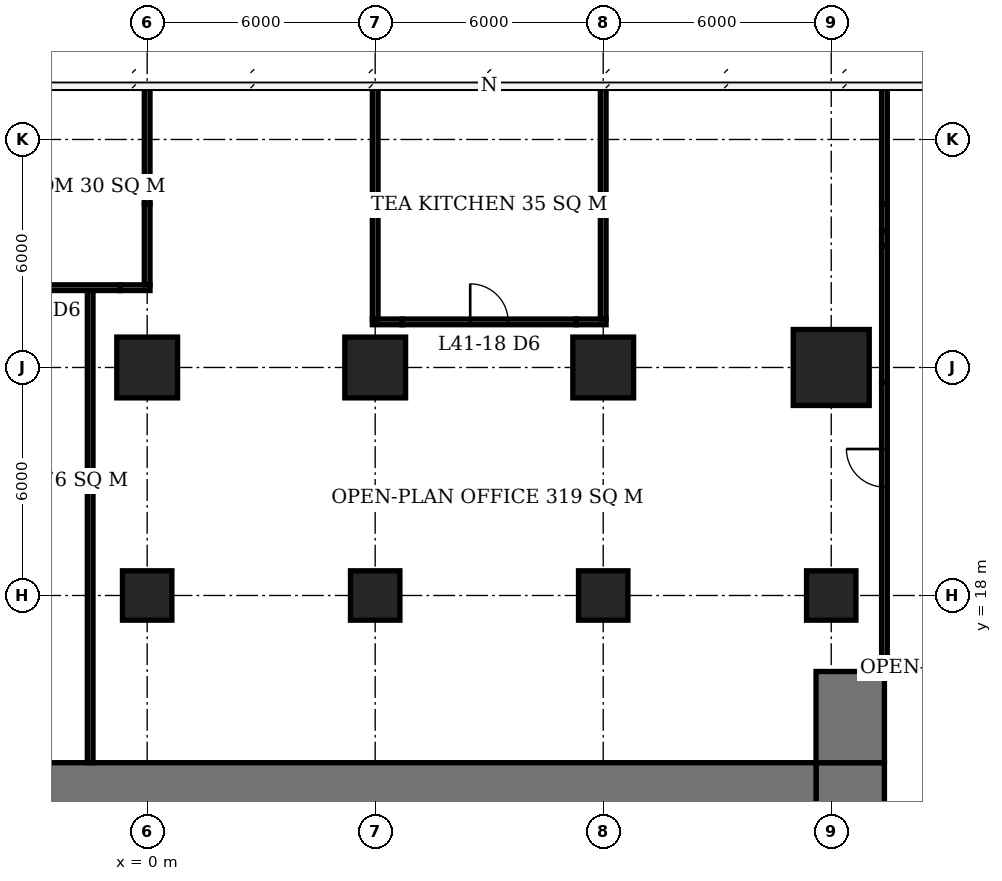
"""IFC4 building model, lengths in metres.
Left out: names, types, materials, properties, quantities, classifications, styles, units other than length and angle.
Written with IfcOpenShell. Run it as: python <this file> out.ifc"""

import sys

from ifc_helpers import new_model, si_unit, direction, frame, frame_2d, origin, origin_2d, place, context, subcontext, project, spatial, rectangle, extrude, element, fill, save


model = new_model("IFC4")
c1 = context("Model", 3, precision=1e-05, world=origin(), true_north=direction((0.0, 1.0)))
c2 = subcontext(c1, "Body", "Model", "MODEL_VIEW")
j1 = project(units=[si_unit("LENGTHUNIT", "METRE"), si_unit("PLANEANGLEUNIT", "RADIAN")], contexts=[c1])
p1 = place(None, origin())
s1 = spatial("IfcSite", under=j1, at=p1, CompositionType="ELEMENT")
p2 = place(p1, origin())
s2 = spatial("IfcBuilding", under=s1, at=p2, CompositionType="ELEMENT")
p3 = place(p2, frame((0.0, 0.0, 169.4)))
s3 = spatial("IfcBuildingStorey", under=s2, at=p3, CompositionType="ELEMENT", Elevation=169.4)
p4 = place(p3, frame((0.0, 18.0, 0.0), z_axis=(0.0, 0.0, 1.0), x_axis=(1.0, 0.0, 0.0)))
e1 = element("IfcColumn", 1, at=p4, inside=s3, PredefinedType="COLUMN", context=c2, shape_type="SweptSolid", body=[
    extrude(rectangle(XDim=1.3, YDim=1.3, at=origin_2d()), origin(), (0.0, 0.0, 1.0), 3.9),
])
p5 = place(p3, frame((0.0, 24.0, 0.0), z_axis=(0.0, 0.0, 1.0), x_axis=(1.0, 0.0, 0.0)))
e2 = element("IfcColumn", 2, at=p5, inside=s3, PredefinedType="COLUMN", context=c2, shape_type="SweptSolid", body=[
    extrude(rectangle(XDim=1.6, YDim=1.6, at=origin_2d()), origin(), (0.0, 0.0, 1.0), 3.9),
])
p6 = place(p3, frame((6.0, 18.0, 0.0), z_axis=(0.0, 0.0, 1.0), x_axis=(1.0, 0.0, 0.0)))
e3 = element("IfcColumn", 3, at=p6, inside=s3, PredefinedType="COLUMN", context=c2, shape_type="SweptSolid", body=[
    extrude(rectangle(XDim=1.3, YDim=1.3, at=origin_2d()), origin(), (0.0, 0.0, 1.0), 3.9),
])
p7 = place(p3, frame((6.0, 24.0, 0.0), z_axis=(0.0, 0.0, 1.0), x_axis=(1.0, 0.0, 0.0)))
e4 = element("IfcColumn", 4, at=p7, inside=s3, PredefinedType="COLUMN", context=c2, shape_type="SweptSolid", body=[
    extrude(rectangle(XDim=1.6, YDim=1.6, at=origin_2d()), origin(), (0.0, 0.0, 1.0), 3.9),
])
p8 = place(p3, frame((12.0, 18.0, 0.0), z_axis=(0.0, 0.0, 1.0), x_axis=(1.0, 0.0, 0.0)))
e5 = element("IfcColumn", 5, at=p8, inside=s3, PredefinedType="COLUMN", context=c2, shape_type="SweptSolid", body=[
    extrude(rectangle(XDim=1.3, YDim=1.3, at=origin_2d()), origin(), (0.0, 0.0, 1.0), 3.9),
])
p9 = place(p3, frame((12.0, 24.0, 0.0), z_axis=(0.0, 0.0, 1.0), x_axis=(1.0, 0.0, 0.0)))
e6 = element("IfcColumn", 6, at=p9, inside=s3, PredefinedType="COLUMN", context=c2, shape_type="SweptSolid", body=[
    extrude(rectangle(XDim=1.6, YDim=1.6, at=origin_2d()), origin(), (0.0, 0.0, 1.0), 3.9),
])
p10 = place(p3, frame((18.0, 18.0, 0.0), z_axis=(0.0, 0.0, 1.0), x_axis=(1.0, 0.0, 0.0)))
e7 = element("IfcColumn", 7, at=p10, inside=s3, PredefinedType="COLUMN", context=c2, shape_type="SweptSolid", body=[
    extrude(rectangle(XDim=1.3, YDim=1.3, at=origin_2d()), origin(), (0.0, 0.0, 1.0), 3.9),
])
p11 = place(p3, frame((18.0, 24.0, 0.0), z_axis=(0.0, 0.0, 1.0), x_axis=(1.0, 0.0, 0.0)))
e8 = element("IfcColumn", 8, at=p11, inside=s3, PredefinedType="COLUMN", context=c2, shape_type="SweptSolid", body=[
    extrude(rectangle(XDim=2.0, YDim=2.0, at=origin_2d()), origin(), (0.0, 0.0, 1.0), 3.9),
])
p12 = place(p3, frame((-5.6, 12.6, 0.0), z_axis=(0.0, 0.0, 1.0), x_axis=(1.0, 0.0, 0.0)))
e9 = element("IfcWall", 9, at=p12, inside=s3, PredefinedType="SHEAR", context=c2, shape_type="SweptSolid", body=[
    extrude(rectangle(XDim=23.2, YDim=2.0, at=frame_2d((11.6, 0.0))), origin(), (0.0, 0.0, 1.0), 3.9),
])
p13 = place(p3, frame((18.5, -7.6, 0.0), z_axis=(0.0, 0.0, 1.0), x_axis=(0.0, 1.0, 0.0)))
e10 = element("IfcWall", 10, at=p13, inside=s3, PredefinedType="SHEAR", context=c2, shape_type="SweptSolid", body=[
    extrude(rectangle(XDim=21.2, YDim=1.8, at=frame_2d((10.6, 0.0))), origin(), (0.0, 0.0, 1.0), 3.9),
])
p14 = place(p13, frame((9.2, 0.0, 0.0)))
e11 = element("IfcOpeningElement", 11, at=p14, cuts=e10, PredefinedType="OPENING", context=c2, shape_type="SweptSolid", body=[
    extrude(rectangle(XDim=1.8, YDim=2.4, at=frame_2d((0.9, 1.2))), frame((0.0, 0.91, 0.0), z_axis=(0.0, -1.0, 0.0), x_axis=(1.0, 0.0, 0.0)), (0.0, 0.0, 1.0), 1.82),
])
p15 = place(p3, frame((18.5, 13.6, 0.0), z_axis=(0.0, 0.0, 1.0), x_axis=(0.0, 1.0, 0.0)))
e12 = element("IfcWall", 12, at=p15, inside=s3, PredefinedType="SHEAR", context=c2, shape_type="SweptSolid", body=[
    extrude(rectangle(XDim=2.4, YDim=1.8, at=frame_2d((1.2, 0.0))), origin(), (0.0, 0.0, 1.0), 3.9),
])
p16 = place(p3, frame((5.925, 25.2, 0.0), z_axis=(0.0, 0.0, 1.0), x_axis=(1.0, 0.0, 0.0)))
e13 = element("IfcWall", 13, at=p16, inside=s3, PredefinedType="PARTITIONING", context=c2, shape_type="SweptSolid", body=[
    extrude(rectangle(XDim=0.785, YDim=0.15, at=frame_2d((0.393, 0.0))), origin(), (0.0, 0.0, 1.0), 2.65),
])
p17 = place(p3, frame((6.71, 25.2, 0.0), z_axis=(0.0, 0.0, 1.0), x_axis=(1.0, 0.0, 0.0)))
e14 = element("IfcWall", 14, at=p17, inside=s3, PredefinedType="PARTITIONING", context=c2, shape_type="SweptSolid", body=[
    extrude(rectangle(XDim=4.58, YDim=0.15, at=frame_2d((2.29, 0.0))), origin(), (0.0, 0.0, 1.0), 3.65),
])
p18 = place(p17, frame((1.79, 0.0, 0.0)))
e15 = element("IfcOpeningElement", 15, at=p18, cuts=e14, PredefinedType="OPENING", context=c2, shape_type="SweptSolid", body=[
    extrude(rectangle(XDim=1.0, YDim=2.1, at=frame_2d((0.5, 1.05))), frame((0.0, 0.085, 0.0), z_axis=(0.0, -1.0, 0.0), x_axis=(1.0, 0.0, 0.0)), (0.0, 0.0, 1.0), 0.17),
])
p19 = place(p3, frame((11.29, 25.2, 0.0), z_axis=(0.0, 0.0, 1.0), x_axis=(1.0, 0.0, 0.0)))
e16 = element("IfcWall", 16, at=p19, inside=s3, PredefinedType="PARTITIONING", context=c2, shape_type="SweptSolid", body=[
    extrude(rectangle(XDim=0.785, YDim=0.15, at=frame_2d((0.393, 0.0))), origin(), (0.0, 0.0, 1.0), 2.65),
])
p20 = place(p3, frame((-5.49, 26.1, 0.0), z_axis=(0.0, 0.0, 1.0), x_axis=(1.0, 0.0, 0.0)))
e17 = element("IfcWall", 17, at=p20, inside=s3, PredefinedType="PARTITIONING", context=c2, shape_type="SweptSolid", body=[
    extrude(rectangle(XDim=4.78, YDim=0.15, at=frame_2d((2.39, 0.0))), origin(), (0.0, 0.0, 1.0), 3.65),
])
p21 = place(p20, frame((1.89, 0.0, 0.0)))
e18 = element("IfcOpeningElement", 18, at=p21, cuts=e17, PredefinedType="OPENING", context=c2, shape_type="SweptSolid", body=[
    extrude(rectangle(XDim=1.0, YDim=2.1, at=frame_2d((0.5, 1.05))), frame((0.0, 0.085, 0.0), z_axis=(0.0, -1.0, 0.0), x_axis=(1.0, 0.0, 0.0)), (0.0, 0.0, 1.0), 0.17),
])
p22 = place(p3, frame((-0.71, 26.1, 0.0), z_axis=(0.0, 0.0, 1.0), x_axis=(1.0, 0.0, 0.0)))
e19 = element("IfcWall", 19, at=p22, inside=s3, PredefinedType="PARTITIONING", context=c2, shape_type="SweptSolid", body=[
    extrude(rectangle(XDim=0.785, YDim=0.15, at=frame_2d((0.393, 0.0))), origin(), (0.0, 0.0, 1.0), 2.65),
])
p23 = place(p3, frame((0.0, 26.175, 0.0), z_axis=(0.0, 0.0, 1.0), x_axis=(0.0, 1.0, 0.0)))
e20 = element("IfcWall", 20, at=p23, inside=s3, PredefinedType="PARTITIONING", context=c2, shape_type="SweptSolid", body=[
    extrude(rectangle(XDim=2.135, YDim=0.15, at=frame_2d((1.067, 0.0))), origin(), (0.0, 0.0, 1.0), 2.65),
])
p24 = place(p3, frame((0.0, 28.31, 0.0), z_axis=(0.0, 0.0, 1.0), x_axis=(0.0, 1.0, 0.0)))
e21 = element("IfcWall", 21, at=p24, inside=s3, PredefinedType="PARTITIONING", context=c2, shape_type="SweptSolid", body=[
    extrude(rectangle(XDim=3.065, YDim=0.15, at=frame_2d((1.532, 0.0))), origin(), (0.0, 0.0, 1.0), 3.65),
])
p25 = place(p3, frame((6.0, 25.275, 0.0), z_axis=(0.0, 0.0, 1.0), x_axis=(0.0, 1.0, 0.0)))
e22 = element("IfcWall", 22, at=p25, inside=s3, PredefinedType="PARTITIONING", context=c2, shape_type="SweptSolid", body=[
    extrude(rectangle(XDim=3.035, YDim=0.15, at=frame_2d((1.518, 0.0))), origin(), (0.0, 0.0, 1.0), 2.65),
])
p26 = place(p3, frame((6.0, 28.31, 0.0), z_axis=(0.0, 0.0, 1.0), x_axis=(0.0, 1.0, 0.0)))
e23 = element("IfcWall", 23, at=p26, inside=s3, PredefinedType="PARTITIONING", context=c2, shape_type="SweptSolid", body=[
    extrude(rectangle(XDim=3.04, YDim=0.15, at=frame_2d((1.52, 0.0))), origin(), (0.0, 0.0, 1.0), 3.65),
])
p27 = place(p3, frame((12.0, 25.275, 0.0), z_axis=(0.0, 0.0, 1.0), x_axis=(0.0, 1.0, 0.0)))
e24 = element("IfcWall", 24, at=p27, inside=s3, PredefinedType="PARTITIONING", context=c2, shape_type="SweptSolid", body=[
    extrude(rectangle(XDim=3.035, YDim=0.15, at=frame_2d((1.518, 0.0))), origin(), (0.0, 0.0, 1.0), 2.65),
])
p28 = place(p3, frame((12.0, 28.31, 0.0), z_axis=(0.0, 0.0, 1.0), x_axis=(0.0, 1.0, 0.0)))
e25 = element("IfcWall", 25, at=p28, inside=s3, PredefinedType="PARTITIONING", context=c2, shape_type="SweptSolid", body=[
    extrude(rectangle(XDim=3.04, YDim=0.15, at=frame_2d((1.52, 0.0))), origin(), (0.0, 0.0, 1.0), 3.65),
])
p29 = place(p3, frame((-1.5, 13.6, 0.0), z_axis=(0.0, 0.0, 1.0), x_axis=(0.0, 1.0, 0.0)))
e26 = element("IfcWall", 26, at=p29, inside=s3, PredefinedType="PARTITIONING", context=c2, shape_type="SweptSolid", body=[
    extrude(rectangle(XDim=12.425, YDim=0.15, at=frame_2d((6.212, 0.0))), origin(), (0.0, 0.0, 1.0), 3.65),
])
p30 = place(p3, frame((19.4, 16.0, 0.0), z_axis=(0.0, 0.0, 1.0), x_axis=(0.0, 1.0, 0.0)))
e27 = element("IfcWall", 27, at=p30, inside=s3, PredefinedType="PARTITIONING", context=c2, shape_type="SweptSolid", body=[
    extrude(rectangle(XDim=7.608, YDim=0.15, at=frame_2d((3.804, 0.0))), origin(), (0.0, 0.0, 1.0), 3.65),
])
p31 = place(p30, frame((4.855, 0.0, 0.0)))
e28 = element("IfcOpeningElement", 28, at=p31, cuts=e27, PredefinedType="OPENING", context=c2, shape_type="SweptSolid", body=[
    extrude(rectangle(XDim=1.0, YDim=2.1, at=frame_2d((0.5, 1.05))), frame((0.0, 0.085, 0.0), z_axis=(0.0, -1.0, 0.0), x_axis=(1.0, 0.0, 0.0)), (0.0, 0.0, 1.0), 0.17),
])
p32 = place(p3, frame((19.4, 23.608, 0.0), z_axis=(0.0, 0.0, 1.0), x_axis=(0.0, 1.0, 0.0)))
e29 = element("IfcWall", 29, at=p32, inside=s3, PredefinedType="PARTITIONING", context=c2, shape_type="SweptSolid", body=[
    extrude(rectangle(XDim=3.584, YDim=0.15, at=frame_2d((1.792, 0.0))), origin(), (0.0, 0.0, 1.0), 2.65),
])
p33 = place(p3, frame((19.4, 27.192, 0.0), z_axis=(0.0, 0.0, 1.0), x_axis=(0.0, 1.0, 0.0)))
e30 = element("IfcWall", 30, at=p33, inside=s3, PredefinedType="PARTITIONING", context=c2, shape_type="SweptSolid", body=[
    extrude(rectangle(XDim=0.398, YDim=0.15, at=frame_2d((0.199, 0.0))), origin(), (0.0, 0.0, 1.0), 3.65),
])
p34 = place(p3, frame((19.4, 27.59, 0.0), z_axis=(0.0, 0.0, 1.0), x_axis=(0.0, 1.0, 0.0)))
e31 = element("IfcWall", 31, at=p34, inside=s3, PredefinedType="PARTITIONING", context=c2, shape_type="SweptSolid", body=[
    extrude(rectangle(XDim=0.72, YDim=0.15, at=frame_2d((0.36, 0.0))), origin(), (0.0, 0.0, 1.0), 2.65),
])
p35 = place(p3, frame((19.4, 28.31, 0.0), z_axis=(0.0, 0.0, 1.0), x_axis=(0.0, 1.0, 0.0)))
e32 = element("IfcWall", 32, at=p35, inside=s3, PredefinedType="PARTITIONING", context=c2, shape_type="SweptSolid", body=[
    extrude(rectangle(XDim=3.065, YDim=0.15, at=frame_2d((1.532, 0.0))), origin(), (0.0, 0.0, 1.0), 3.65),
])
p36 = place(p18, origin())
e33 = element("IfcDoor", 33, at=p36, inside=s3, OperationType="SINGLE_SWING_LEFT", PredefinedType="DOOR", context=c2, shape_type="SweptSolid", body=[
    extrude(rectangle(XDim=1.0, YDim=2.1, at=frame_2d((0.5, 1.05))), frame((0.0, 0.025, 0.0), z_axis=(0.0, -1.0, 0.0), x_axis=(1.0, 0.0, 0.0)), (0.0, 0.0, 1.0), 0.05),
])
fill(e15, e33)
p37 = place(p31, origin())
e34 = element("IfcDoor", 34, at=p37, inside=s3, OperationType="SINGLE_SWING_RIGHT", PredefinedType="DOOR", context=c2, shape_type="SweptSolid", body=[
    extrude(rectangle(XDim=1.0, YDim=2.1, at=frame_2d((0.5, 1.05))), frame((0.0, 0.025, 0.0), z_axis=(0.0, -1.0, 0.0), x_axis=(1.0, 0.0, 0.0)), (0.0, 0.0, 1.0), 0.05),
])
fill(e28, e34)
save(model, sys.argv[1])
